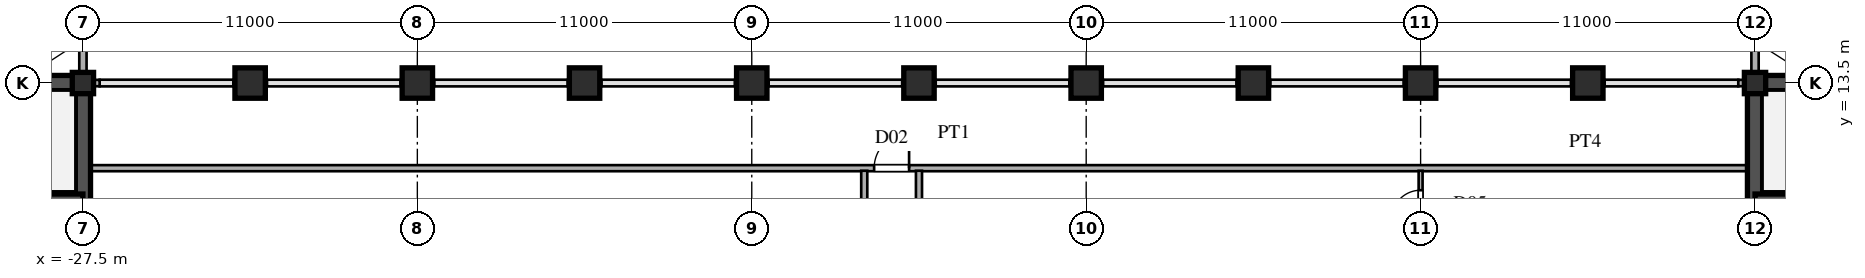
"""IFC4 building model, lengths in metres.
Left out: names, types, materials, properties, quantities, classifications, styles, units other than length and angle.
Written with IfcOpenShell. Run it as: python <this file> out.ifc"""

import sys

from ifc_helpers import new_model, si_unit, direction, frame, frame_2d, origin, origin_2d, place, context, subcontext, project, spatial, rectangle, hollow_rectangle, extrude, source, transform, mapped, element, fill, save


model = new_model("IFC4")
c1 = context("Model", 3, precision=1e-05, world=origin(), true_north=direction((0.0, 1.0)))
c2 = subcontext(c1, "Body", "Model", "MODEL_VIEW")
j1 = project(units=[si_unit("LENGTHUNIT", "METRE"), si_unit("PLANEANGLEUNIT", "RADIAN")], contexts=[c1])
p1 = place(None, origin())
s1 = spatial("IfcSite", under=j1, at=p1, CompositionType="ELEMENT")
p2 = place(p1, origin())
s2 = spatial("IfcBuilding", under=s1, at=p2, CompositionType="ELEMENT")
p3 = place(p2, frame((0.0, 0.0, 234.6)))
s3 = spatial("IfcBuildingStorey", under=s2, at=p3, CompositionType="ELEMENT", Elevation=234.6)
m1 = source(origin(), c2, "Body", "SweptSolid", [
    extrude(hollow_rectangle(XDim=0.7, YDim=0.7, WallThickness=0.03, at=origin_2d()), origin(), (0.0, 0.0, 1.0), 4.8),
])
for number, where, z_axis, x_axis in (
    (1, (-27.5, 13.5, 0.0), (0.0, 0.0, 1.0), (1.0, 0.0, 0.0)),
    (2, (27.5, 13.5, 0.0), (0.0, 0.0, 1.0), (1.0, 0.0, 0.0)),
):
    element("IfcColumn", number, at=place(p3, frame(where, z_axis=z_axis, x_axis=x_axis)), inside=s3, PredefinedType="COLUMN", context=c2, shape_type="MappedRepresentation", body=[
        mapped(m1, transform((0.0, 0.0, 0.0), scale=1.0)),
    ])
m2 = source(origin(), c2, "Body", "SweptSolid", [
    extrude(hollow_rectangle(XDim=1.0, YDim=1.0, WallThickness=0.042, at=origin_2d()), origin(), (0.0, 0.0, 1.0), 4.8),
])
for number, where, z_axis, x_axis in (
    (3, (-22.0, 13.5, 0.0), (0.0, 0.0, 1.0), (1.0, 0.0, 0.0)),
    (4, (-16.5, 13.5, 0.0), (0.0, 0.0, 1.0), (1.0, 0.0, 0.0)),
    (5, (-11.0, 13.5, 0.0), (0.0, 0.0, 1.0), (1.0, 0.0, 0.0)),
    (6, (-5.5, 13.5, 0.0), (0.0, 0.0, 1.0), (1.0, 0.0, 0.0)),
    (7, (0.0, 13.5, 0.0), (0.0, 0.0, 1.0), (1.0, 0.0, 0.0)),
    (8, (5.5, 13.5, 0.0), (0.0, 0.0, 1.0), (1.0, 0.0, 0.0)),
    (9, (11.0, 13.5, 0.0), (0.0, 0.0, 1.0), (1.0, 0.0, 0.0)),
    (10, (16.5, 13.5, 0.0), (0.0, 0.0, 1.0), (1.0, 0.0, 0.0)),
    (11, (22.0, 13.5, 0.0), (0.0, 0.0, 1.0), (1.0, 0.0, 0.0)),
):
    element("IfcColumn", number, at=place(p3, frame(where, z_axis=z_axis, x_axis=x_axis)), inside=s3, PredefinedType="COLUMN", context=c2, shape_type="MappedRepresentation", body=[
        mapped(m2, transform((0.0, 0.0, 0.0), scale=1.0)),
    ])
p4 = place(p3, frame((-27.5, 13.755, 0.0), z_axis=(0.0, 0.0, 1.0), x_axis=(0.0, 1.0, 0.0)))
e12 = element("IfcWall", 12, at=p4, inside=s3, PredefinedType="SOLIDWALL", context=c2, shape_type="SweptSolid", body=[
    extrude(rectangle(XDim=0.62, YDim=0.24, at=frame_2d((0.31, 0.0))), origin(), (0.0, 0.0, 1.0), 4.08),
])
p5 = place(p3, frame((-27.5, 14.375, 0.0), z_axis=(0.0, 0.0, 1.0), x_axis=(0.0, 1.0, 0.0)))
e13 = element("IfcWall", 13, at=p5, inside=s3, PredefinedType="SOLIDWALL", context=c2, shape_type="SweptSolid", body=[
    extrude(rectangle(XDim=1.605, YDim=0.24, at=frame_2d((0.803, 0.0))), origin(), (0.0, 0.0, 1.0), 4.58),
])
p6 = place(p3, frame((27.5, 13.755, 0.0), z_axis=(0.0, 0.0, 1.0), x_axis=(0.0, 1.0, 0.0)))
e14 = element("IfcWall", 14, at=p6, inside=s3, PredefinedType="SOLIDWALL", context=c2, shape_type="SweptSolid", body=[
    extrude(rectangle(XDim=0.62, YDim=0.24, at=frame_2d((0.31, 0.0))), origin(), (0.0, 0.0, 1.0), 4.08),
])
p7 = place(p3, frame((27.5, 14.375, 0.0), z_axis=(0.0, 0.0, 1.0), x_axis=(0.0, 1.0, 0.0)))
e15 = element("IfcWall", 15, at=p7, inside=s3, PredefinedType="SOLIDWALL", context=c2, shape_type="SweptSolid", body=[
    extrude(rectangle(XDim=1.605, YDim=0.24, at=frame_2d((0.803, 0.0))), origin(), (0.0, 0.0, 1.0), 4.58),
])
p8 = place(p3, frame((-27.49, 13.5, 0.0), z_axis=(0.0, 0.0, 1.0), x_axis=(1.0, 0.0, 0.0)))
e16 = element("IfcWall", 16, at=p8, inside=s3, PredefinedType="SOLIDWALL", context=c2, shape_type="SweptSolid", body=[
    extrude(rectangle(XDim=0.54, YDim=0.21, at=frame_2d((0.27, 0.0))), origin(), (0.0, 0.0, 1.0), 2.78),
])
for number, where, z_axis, x_axis in (
    (17, (-22.55, 13.5, 0.0), (0.0, 0.0, 1.0), (1.0, 0.0, 0.0)),
    (18, (-17.05, 13.5, 0.0), (0.0, 0.0, 1.0), (1.0, 0.0, 0.0)),
    (19, (-11.55, 13.5, 0.0), (0.0, 0.0, 1.0), (1.0, 0.0, 0.0)),
    (20, (-6.05, 13.5, 0.0), (0.0, 0.0, 1.0), (1.0, 0.0, 0.0)),
    (21, (-0.55, 13.5, 0.0), (0.0, 0.0, 1.0), (1.0, 0.0, 0.0)),
    (22, (4.95, 13.5, 0.0), (0.0, 0.0, 1.0), (1.0, 0.0, 0.0)),
    (23, (10.45, 13.5, 0.0), (0.0, 0.0, 1.0), (1.0, 0.0, 0.0)),
    (24, (15.95, 13.5, 0.0), (0.0, 0.0, 1.0), (1.0, 0.0, 0.0)),
    (25, (21.45, 13.5, 0.0), (0.0, 0.0, 1.0), (1.0, 0.0, 0.0)),
):
    element("IfcWall", number, at=place(p3, frame(where, z_axis=z_axis, x_axis=x_axis)), inside=s3, PredefinedType="SOLIDWALL", context=c2, shape_type="SweptSolid", body=[
        extrude(rectangle(XDim=1.1, YDim=0.21, at=frame_2d((0.55, 0.0))), origin(), (0.0, 0.0, 1.0), 2.78),
    ])
p9 = place(p3, frame((26.95, 13.5, 0.0), z_axis=(0.0, 0.0, 1.0), x_axis=(1.0, 0.0, 0.0)))
e26 = element("IfcWall", 26, at=p9, inside=s3, PredefinedType="SOLIDWALL", context=c2, shape_type="SweptSolid", body=[
    extrude(rectangle(XDim=0.54, YDim=0.21, at=frame_2d((0.27, 0.0))), origin(), (0.0, 0.0, 1.0), 2.78),
])
p10 = place(p3, frame((-27.5, 1.3, 0.0), z_axis=(0.0, 0.0, 1.0), x_axis=(0.0, 1.0, 0.0)))
e27 = element("IfcWall", 27, at=p10, inside=s3, PredefinedType="SHEAR", context=c2, shape_type="SweptSolid", body=[
    extrude(rectangle(XDim=12.2, YDim=0.5, at=frame_2d((6.1, 0.0))), origin(), (0.0, 0.0, 1.0), 4.58),
])
p11 = place(p3, frame((-36.5, 13.5, 0.0), z_axis=(0.0, 0.0, 1.0), x_axis=(1.0, 0.0, 0.0)))
e28 = element("IfcWall", 28, at=p11, inside=s3, PredefinedType="SHEAR", context=c2, shape_type="SweptSolid", body=[
    extrude(rectangle(XDim=9.0, YDim=0.5, at=frame_2d((4.5, 0.0))), origin(), (0.0, 0.0, 1.0), 4.58),
])
p12 = place(p3, frame((-36.5, 9.7, 0.0), z_axis=(0.0, 0.0, 1.0), x_axis=(1.0, 0.0, 0.0)))
e29 = element("IfcWall", 29, at=p12, inside=s3, PredefinedType="SHEAR", context=c2, shape_type="SweptSolid", body=[
    extrude(rectangle(XDim=9.0, YDim=0.3, at=frame_2d((4.5, 0.0))), origin(), (0.0, 0.0, 1.0), 4.58),
])
p13 = place(p12, frame((0.6, 0.0, 0.0)))
e30 = element("IfcOpeningElement", 30, at=p13, cuts=e29, PredefinedType="OPENING", context=c2, shape_type="SweptSolid", body=[
    extrude(rectangle(XDim=1.1, YDim=2.2, at=frame_2d((0.55, 1.1))), frame((0.0, 0.16, 0.0), z_axis=(0.0, -1.0, 0.0), x_axis=(1.0, 0.0, 0.0)), (0.0, 0.0, 1.0), 0.32),
])
p14 = place(p3, frame((27.5, 1.3, 0.0), z_axis=(0.0, 0.0, 1.0), x_axis=(0.0, 1.0, 0.0)))
e31 = element("IfcWall", 31, at=p14, inside=s3, PredefinedType="SHEAR", context=c2, shape_type="SweptSolid", body=[
    extrude(rectangle(XDim=12.2, YDim=0.5, at=frame_2d((6.1, 0.0))), origin(), (0.0, 0.0, 1.0), 4.58),
])
p15 = place(p3, frame((27.5, 13.5, 0.0), z_axis=(0.0, 0.0, 1.0), x_axis=(1.0, 0.0, 0.0)))
e32 = element("IfcWall", 32, at=p15, inside=s3, PredefinedType="SHEAR", context=c2, shape_type="SweptSolid", body=[
    extrude(rectangle(XDim=9.0, YDim=0.5, at=frame_2d((4.5, 0.0))), origin(), (0.0, 0.0, 1.0), 4.58),
])
p16 = place(p3, frame((27.5, 9.7, 0.0), z_axis=(0.0, 0.0, 1.0), x_axis=(1.0, 0.0, 0.0)))
e33 = element("IfcWall", 33, at=p16, inside=s3, PredefinedType="SHEAR", context=c2, shape_type="SweptSolid", body=[
    extrude(rectangle(XDim=9.0, YDim=0.3, at=frame_2d((4.5, 0.0))), origin(), (0.0, 0.0, 1.0), 4.58),
])
p17 = place(p16, frame((7.3, 0.0, 0.0)))
e34 = element("IfcOpeningElement", 34, at=p17, cuts=e33, PredefinedType="OPENING", context=c2, shape_type="SweptSolid", body=[
    extrude(rectangle(XDim=1.1, YDim=2.2, at=frame_2d((0.55, 1.1))), frame((0.0, 0.16, 0.0), z_axis=(0.0, -1.0, 0.0), x_axis=(1.0, 0.0, 0.0)), (0.0, 0.0, 1.0), 0.32),
])
p18 = place(p3, frame((-27.245, 10.7, 0.0), z_axis=(0.0, 0.0, 1.0), x_axis=(1.0, 0.0, 0.0)))
e35 = element("IfcWall", 35, at=p18, inside=s3, PredefinedType="PARTITIONING", context=c2, shape_type="SweptSolid", body=[
    extrude(rectangle(XDim=54.49, YDim=0.2, at=frame_2d((27.245, 0.0))), origin(), (0.0, 0.0, 1.0), 4.58),
])
p19 = place(p18, frame((25.77, 0.0, 0.0)))
e36 = element("IfcOpeningElement", 36, at=p19, cuts=e35, PredefinedType="OPENING", context=c2, shape_type="SweptSolid", body=[
    extrude(rectangle(XDim=1.15, YDim=2.2, at=frame_2d((0.575, 1.1))), frame((0.0, 0.11, 0.0), z_axis=(0.0, -1.0, 0.0), x_axis=(1.0, 0.0, 0.0)), (0.0, 0.0, 1.0), 0.22),
])
p20 = place(p3, frame((-1.8, 5.385, 0.0), z_axis=(0.0, 0.0, 1.0), x_axis=(0.0, 1.0, 0.0)))
e37 = element("IfcWall", 37, at=p20, inside=s3, PredefinedType="PARTITIONING", context=c2, shape_type="SweptSolid", body=[
    extrude(rectangle(XDim=5.23, YDim=0.2, at=frame_2d((2.615, 0.0))), origin(), (0.0, 0.0, 1.0), 4.58),
])
p21 = place(p3, frame((0.0, 5.385, 0.0), z_axis=(0.0, 0.0, 1.0), x_axis=(0.0, 1.0, 0.0)))
e38 = element("IfcWall", 38, at=p21, inside=s3, PredefinedType="PARTITIONING", context=c2, shape_type="SweptSolid", body=[
    extrude(rectangle(XDim=5.23, YDim=0.2, at=frame_2d((2.615, 0.0))), origin(), (0.0, 0.0, 1.0), 3.48),
])
p22 = place(p3, frame((16.5, 5.385, 0.0), z_axis=(0.0, 0.0, 1.0), x_axis=(0.0, 1.0, 0.0)))
e39 = element("IfcWall", 39, at=p22, inside=s3, PredefinedType="PARTITIONING", context=c2, shape_type="SweptSolid", body=[
    extrude(rectangle(XDim=5.23, YDim=0.13, at=frame_2d((2.615, 0.0))), origin(), (0.0, 0.0, 1.0), 3.48),
])
p23 = place(p22, frame((3.64, 0.0, 0.0)))
e40 = element("IfcOpeningElement", 40, at=p23, cuts=e39, PredefinedType="OPENING", context=c2, shape_type="SweptSolid", body=[
    extrude(rectangle(XDim=0.95, YDim=2.15, at=frame_2d((0.475, 1.075))), frame((0.0, 0.075, 0.0), z_axis=(0.0, -1.0, 0.0), x_axis=(1.0, 0.0, 0.0)), (0.0, 0.0, 1.0), 0.15),
])
m3 = source(origin(), c2, "Body", "SweptSolid", [
    extrude(rectangle(XDim=1.15, YDim=2.2, at=frame_2d((0.575, 1.1))), frame((0.0, 0.025, 0.0), z_axis=(0.0, -1.0, 0.0), x_axis=(1.0, 0.0, 0.0)), (0.0, 0.0, 1.0), 0.05),
])
p24 = place(p19, origin())
e41 = element("IfcDoor", 41, at=p24, inside=s3, OperationType="SINGLE_SWING_RIGHT", PredefinedType="DOOR", context=c2, shape_type="MappedRepresentation", body=[
    mapped(m3, transform((0.0, 0.0, 0.0), scale=1.0)),
])
fill(e36, e41)
m4 = source(origin(), c2, "Body", "SweptSolid", [
    extrude(rectangle(XDim=0.95, YDim=2.15, at=frame_2d((0.475, 1.075))), frame((0.0, 0.025, 0.0), z_axis=(0.0, -1.0, 0.0), x_axis=(1.0, 0.0, 0.0)), (0.0, 0.0, 1.0), 0.05),
])
p25 = place(p23, origin())
e42 = element("IfcDoor", 42, at=p25, inside=s3, OperationType="SINGLE_SWING_LEFT", PredefinedType="DOOR", context=c2, shape_type="MappedRepresentation", body=[
    mapped(m4, transform((0.0, 0.0, 0.0), scale=1.0)),
])
fill(e40, e42)
save(model, sys.argv[1])
